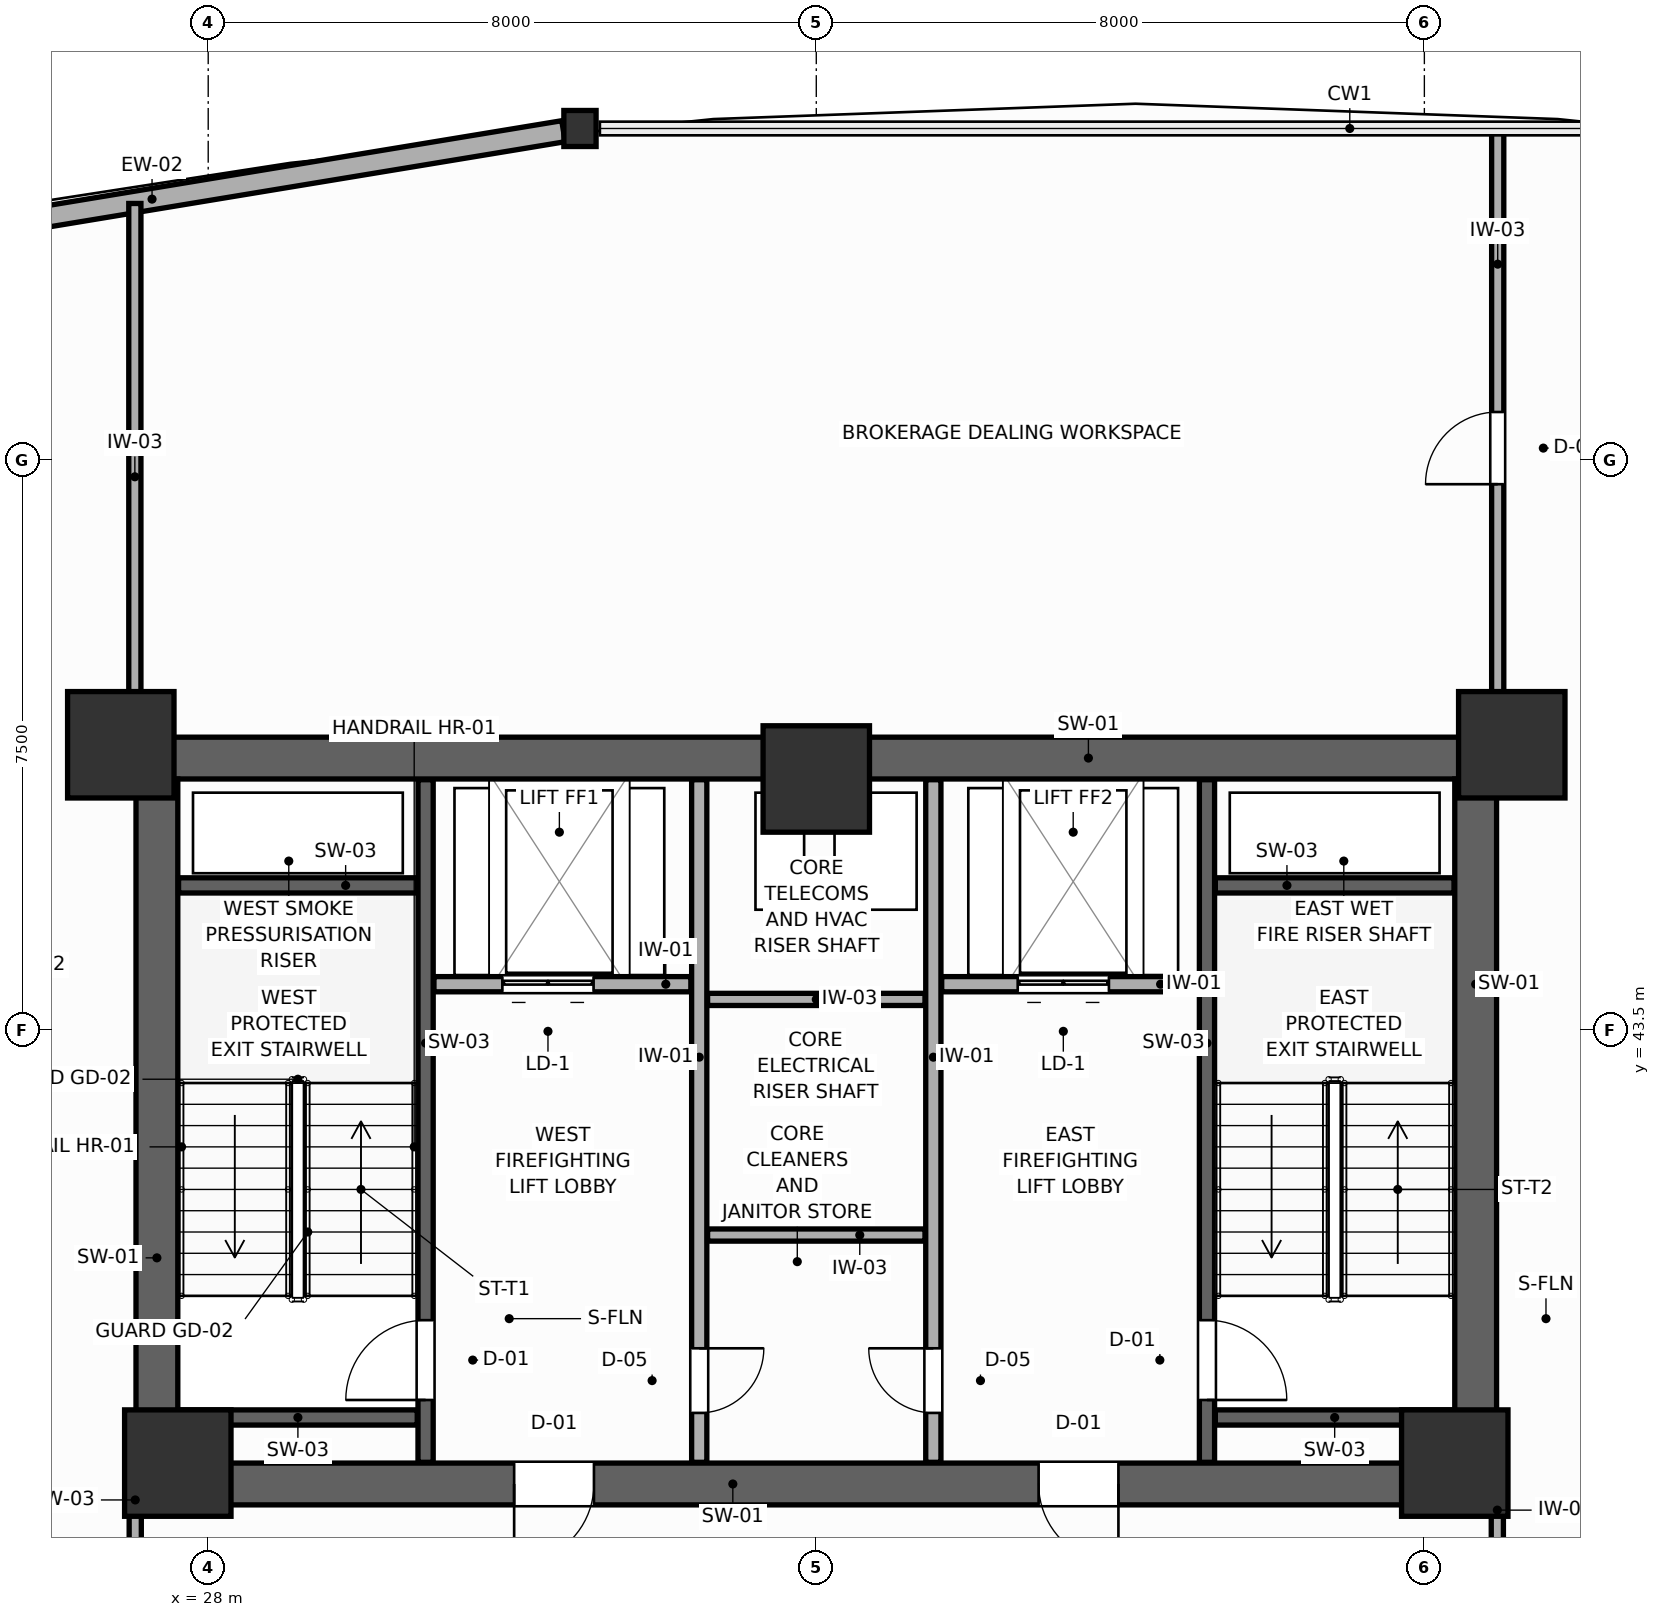
"""IFC4 building model, lengths in metres.
Left out: names, types, materials, properties, quantities, classifications, styles, units other than length and angle.
Written with IfcOpenShell. Run it as: python <this file> out.ifc"""

import sys

from ifc_helpers import new_model, si_unit, direction, frame, frame_2d, origin, origin_2d, place, context, subcontext, project, spatial, rectangle, i_section, extrude, source, transform, mapped, element, fill, save


model = new_model("IFC4")
c1 = context("Model", 3, precision=1e-05, world=origin(), true_north=direction((0.0, 1.0)))
c2 = subcontext(c1, "Body", "Model", "MODEL_VIEW")
j1 = project(units=[si_unit("LENGTHUNIT", "METRE"), si_unit("PLANEANGLEUNIT", "RADIAN")], contexts=[c1])
p1 = place(None, origin())
s1 = spatial("IfcSite", under=j1, at=p1, CompositionType="ELEMENT")
p2 = place(p1, origin())
s2 = spatial("IfcBuilding", under=s1, at=p2, CompositionType="ELEMENT")
p3 = place(p2, frame((0.0, 0.0, 95.1)))
s3 = spatial("IfcBuildingStorey", under=s2, at=p3, CompositionType="ELEMENT", Elevation=95.1)
p4 = place(p3, frame((27.05, 47.075, 0.0), z_axis=(0.0, 0.0, 1.0), x_axis=(1.0, 0.0, 0.0)))
e1 = element("IfcWall", 1, at=p4, inside=s3, PredefinedType="SHEAR", context=c2, shape_type="SweptSolid", body=[
    extrude(rectangle(XDim=17.9, YDim=0.55, at=frame_2d((8.95, 0.0))), origin(), (0.0, 0.0, 1.0), 3.9),
])
p5 = place(p3, frame((27.05, 37.525, 0.0), z_axis=(0.0, 0.0, 1.0), x_axis=(1.0, 0.0, 0.0)))
e2 = element("IfcWall", 2, at=p5, inside=s3, PredefinedType="SHEAR", context=c2, shape_type="SweptSolid", body=[
    extrude(rectangle(XDim=17.9, YDim=0.55, at=frame_2d((8.95, 0.0))), origin(), (0.0, 0.0, 1.0), 3.9),
])
p6 = place(p5, frame((4.975, 0.0, 0.0)))
e3 = element("IfcOpeningElement", 3, at=p6, cuts=e2, PredefinedType="OPENING", context=c2, shape_type="SweptSolid", body=[
    extrude(rectangle(XDim=1.05, YDim=2.1, at=frame_2d((0.525, 1.05))), frame((0.0, 0.285, 0.0), z_axis=(0.0, -1.0, 0.0), x_axis=(1.0, 0.0, 0.0)), (0.0, 0.0, 1.0), 0.57),
])
p7 = place(p5, frame((11.875, 0.0, 0.0)))
e4 = element("IfcOpeningElement", 4, at=p7, cuts=e2, PredefinedType="OPENING", context=c2, shape_type="SweptSolid", body=[
    extrude(rectangle(XDim=1.05, YDim=2.1, at=frame_2d((0.525, 1.05))), frame((0.0, 0.285, 0.0), z_axis=(0.0, -1.0, 0.0), x_axis=(1.0, 0.0, 0.0)), (0.0, 0.0, 1.0), 0.57),
])
for number, where, z_axis, x_axis in (
    (5, (27.325, 37.8, 0.0), (0.0, 0.0, 1.0), (0.0, 1.0, 0.0)),
    (6, (44.675, 37.8, 0.0), (0.0, 0.0, 1.0), (0.0, 1.0, 0.0)),
):
    element("IfcWall", number, at=place(p3, frame(where, z_axis=z_axis, x_axis=x_axis)), inside=s3, PredefinedType="SHEAR", context=c2, shape_type="SweptSolid", body=[
        extrude(rectangle(XDim=9.0, YDim=0.55, at=frame_2d((4.5, 0.0))), origin(), (0.0, 0.0, 1.0), 3.9),
    ])
m1 = source(origin(), c2, "Body", "SweptSolid", [
    extrude(rectangle(XDim=1.4, YDim=1.4, at=origin_2d()), origin(), (0.0, 0.0, 1.0), 3.9),
])
for number, where, z_axis, x_axis in (
    (7, (26.85, 47.25, 0.0), (0.0, 0.0, 1.0), (1.0, 0.0, 0.0)),
    (8, (45.15, 47.25, 0.0), (0.0, 0.0, 1.0), (1.0, 0.0, 0.0)),
    (9, (27.6, 37.8, 0.0), (0.0, 0.0, 1.0), (1.0, 0.0, 0.0)),
    (10, (44.4, 37.8, 0.0), (0.0, 0.0, 1.0), (1.0, 0.0, 0.0)),
    (11, (36.0, 46.8, 0.0), (0.0, 0.0, 1.0), (1.0, 0.0, 0.0)),
):
    element("IfcColumn", number, at=place(p3, frame(where, z_axis=z_axis, x_axis=x_axis)), inside=s3, PredefinedType="COLUMN", context=c2, shape_type="MappedRepresentation", body=[
        mapped(m1, transform((0.0, 0.0, 0.0), scale=1.0)),
    ])
m2 = source(origin(), c2, "Body", "SweptSolid", [
    extrude(i_section(OverallWidth=0.424, OverallDepth=0.474, WebThickness=0.045, FlangeThickness=0.072, FilletRadius=0.015, at=origin_2d()), origin(), (0.0, 0.0, 1.0), 3.9),
])
p8 = place(p3, frame((32.891, 55.358, 0.0), z_axis=(0.0, 0.0, 1.0), x_axis=(1.0, 0.0, 0.0)))
e12 = element("IfcColumn", 12, at=p8, inside=s3, PredefinedType="COLUMN", context=c2, shape_type="MappedRepresentation", body=[
    mapped(m2, transform((0.0, 0.0, 0.0), scale=1.0)),
])
p9 = place(p3, frame((32.674, 55.322, 0.0), z_axis=(0.0, 0.0, 1.0), x_axis=(-0.986649424809, -0.162858566012, 0.0)))
e13 = element("IfcWall", 13, at=p9, inside=s3, PredefinedType="SOLIDWALL", context=c2, shape_type="SweptSolid", body=[
    extrude(rectangle(XDim=16.836, YDim=0.28, at=frame_2d((8.418, 0.0))), origin(), (0.0, 0.0, 1.0), 2.07),
])
p10 = place(p9, frame((11.152, 0.0, 0.75)))
e14 = element("IfcOpeningElement", 14, at=p10, cuts=e13, PredefinedType="OPENING", context=c2, shape_type="SweptSolid", body=[
    extrude(rectangle(XDim=1.7, YDim=1.1, at=frame_2d((0.85, 0.55))), frame((0.0, 0.15, 0.0), z_axis=(0.0, -1.0, 0.0), x_axis=(1.0, 0.0, 0.0)), (0.0, 0.0, 1.0), 0.3),
])
p11 = place(p3, frame((30.86, 37.81, 0.0), z_axis=(0.0, 0.0, 1.0), x_axis=(0.0, 1.0, 0.0)))
e15 = element("IfcWall", 15, at=p11, inside=s3, PredefinedType="SHEAR", context=c2, shape_type="SweptSolid", body=[
    extrude(rectangle(XDim=8.98, YDim=0.2, at=frame_2d((4.49, 0.0))), origin(), (0.0, 0.0, 1.0), 3.9),
])
p12 = place(p11, frame((0.82, 0.0, 0.0)))
e16 = element("IfcOpeningElement", 16, at=p12, cuts=e15, PredefinedType="OPENING", context=c2, shape_type="SweptSolid", body=[
    extrude(rectangle(XDim=1.05, YDim=2.1, at=frame_2d((0.525, 1.05))), frame((0.0, 0.11, 0.0), z_axis=(0.0, -1.0, 0.0), x_axis=(1.0, 0.0, 0.0)), (0.0, 0.0, 1.0), 0.22),
])
for number, where, z_axis, x_axis in (
    (17, (27.61, 45.4, 0.0), (0.0, 0.0, 1.0), (1.0, 0.0, 0.0)),
    (18, (27.61, 38.4, 0.0), (0.0, 0.0, 1.0), (1.0, 0.0, 0.0)),
):
    element("IfcWall", number, at=place(p3, frame(where, z_axis=z_axis, x_axis=x_axis)), inside=s3, PredefinedType="SHEAR", context=c2, shape_type="SweptSolid", body=[
        extrude(rectangle(XDim=3.14, YDim=0.2, at=frame_2d((1.57, 0.0))), origin(), (0.0, 0.0, 1.0), 3.9),
    ])
p13 = place(p3, frame((41.14, 37.81, 0.0), z_axis=(0.0, 0.0, 1.0), x_axis=(0.0, 1.0, 0.0)))
e19 = element("IfcWall", 19, at=p13, inside=s3, PredefinedType="SHEAR", context=c2, shape_type="SweptSolid", body=[
    extrude(rectangle(XDim=8.98, YDim=0.2, at=frame_2d((4.49, 0.0))), origin(), (0.0, 0.0, 1.0), 3.9),
])
p14 = place(p13, frame((0.82, 0.0, 0.0)))
e20 = element("IfcOpeningElement", 20, at=p14, cuts=e19, PredefinedType="OPENING", context=c2, shape_type="SweptSolid", body=[
    extrude(rectangle(XDim=1.05, YDim=2.1, at=frame_2d((0.525, 1.05))), frame((0.0, 0.11, 0.0), z_axis=(0.0, -1.0, 0.0), x_axis=(1.0, 0.0, 0.0)), (0.0, 0.0, 1.0), 0.22),
])
for number, where, z_axis, x_axis in (
    (21, (41.25, 45.4, 0.0), (0.0, 0.0, 1.0), (1.0, 0.0, 0.0)),
    (22, (41.25, 38.4, 0.0), (0.0, 0.0, 1.0), (1.0, 0.0, 0.0)),
):
    element("IfcWall", number, at=place(p3, frame(where, z_axis=z_axis, x_axis=x_axis)), inside=s3, PredefinedType="SHEAR", context=c2, shape_type="SweptSolid", body=[
        extrude(rectangle(XDim=3.14, YDim=0.2, at=frame_2d((1.57, 0.0))), origin(), (0.0, 0.0, 1.0), 3.9),
    ])
p15 = place(p3, frame((30.97, 44.1, 0.0), z_axis=(0.0, 0.0, 1.0), x_axis=(1.0, 0.0, 0.0)))
e23 = element("IfcWall", 23, at=p15, inside=s3, PredefinedType="PARTITIONING", context=c2, shape_type="SweptSolid", body=[
    extrude(rectangle(XDim=3.38, YDim=0.2, at=frame_2d((1.69, 0.0))), origin(), (0.0, 0.0, 1.0), 3.7),
])
p16 = place(p15, frame((0.9, 0.0, 0.0)))
e24 = element("IfcOpeningElement", 24, at=p16, cuts=e23, PredefinedType="OPENING", context=c2, shape_type="SweptSolid", body=[
    extrude(rectangle(XDim=1.2, YDim=2.1, at=frame_2d((0.6, 1.05))), frame((0.0, 0.11, 0.0), z_axis=(0.0, -1.0, 0.0), x_axis=(1.0, 0.0, 0.0)), (0.0, 0.0, 1.0), 0.22),
])
p17 = place(p3, frame((37.65, 44.1, 0.0), z_axis=(0.0, 0.0, 1.0), x_axis=(1.0, 0.0, 0.0)))
e25 = element("IfcWall", 25, at=p17, inside=s3, PredefinedType="PARTITIONING", context=c2, shape_type="SweptSolid", body=[
    extrude(rectangle(XDim=3.38, YDim=0.2, at=frame_2d((1.69, 0.0))), origin(), (0.0, 0.0, 1.0), 3.7),
])
p18 = place(p17, frame((1.0, 0.0, 0.0)))
e26 = element("IfcOpeningElement", 26, at=p18, cuts=e25, PredefinedType="OPENING", context=c2, shape_type="SweptSolid", body=[
    extrude(rectangle(XDim=1.2, YDim=2.1, at=frame_2d((0.6, 1.05))), frame((0.0, 0.11, 0.0), z_axis=(0.0, -1.0, 0.0), x_axis=(1.0, 0.0, 0.0)), (0.0, 0.0, 1.0), 0.22),
])
p19 = place(p3, frame((34.46, 37.81, 0.0), z_axis=(0.0, 0.0, 1.0), x_axis=(0.0, 1.0, 0.0)))
e27 = element("IfcWall", 27, at=p19, inside=s3, PredefinedType="PARTITIONING", context=c2, shape_type="SweptSolid", body=[
    extrude(rectangle(XDim=8.98, YDim=0.2, at=frame_2d((4.49, 0.0))), origin(), (0.0, 0.0, 1.0), 3.7),
])
p20 = place(p19, frame((0.65, 0.0, 0.0)))
e28 = element("IfcOpeningElement", 28, at=p20, cuts=e27, PredefinedType="OPENING", context=c2, shape_type="SweptSolid", body=[
    extrude(rectangle(XDim=0.85, YDim=2.05, at=frame_2d((0.425, 1.025))), frame((0.0, 0.11, 0.0), z_axis=(0.0, -1.0, 0.0), x_axis=(1.0, 0.0, 0.0)), (0.0, 0.0, 1.0), 0.22),
])
p21 = place(p3, frame((37.54, 37.81, 0.0), z_axis=(0.0, 0.0, 1.0), x_axis=(0.0, 1.0, 0.0)))
e29 = element("IfcWall", 29, at=p21, inside=s3, PredefinedType="PARTITIONING", context=c2, shape_type="SweptSolid", body=[
    extrude(rectangle(XDim=8.98, YDim=0.2, at=frame_2d((4.49, 0.0))), origin(), (0.0, 0.0, 1.0), 3.7),
])
p22 = place(p21, frame((0.65, 0.0, 0.0)))
e30 = element("IfcOpeningElement", 30, at=p22, cuts=e29, PredefinedType="OPENING", context=c2, shape_type="SweptSolid", body=[
    extrude(rectangle(XDim=0.85, YDim=2.05, at=frame_2d((0.425, 1.025))), frame((0.0, 0.11, 0.0), z_axis=(0.0, -1.0, 0.0), x_axis=(1.0, 0.0, 0.0)), (0.0, 0.0, 1.0), 0.22),
])
for number, where, z_axis, x_axis in (
    (31, (34.57, 40.8, 0.0), (0.0, 0.0, 1.0), (1.0, 0.0, 0.0)),
    (32, (34.57, 43.9, 0.0), (0.0, 0.0, 1.0), (1.0, 0.0, 0.0)),
):
    element("IfcWall", number, at=place(p3, frame(where, z_axis=z_axis, x_axis=x_axis)), inside=s3, PredefinedType="PARTITIONING", context=c2, shape_type="SweptSolid", body=[
        extrude(rectangle(XDim=2.86, YDim=0.16, at=frame_2d((1.43, 0.0))), origin(), (0.0, 0.0, 1.0), 3.7),
    ])
p23 = place(p3, frame((27.04, 35.0, 0.0), z_axis=(0.0, 0.0, 1.0), x_axis=(0.0, 1.0, 0.0)))
e33 = element("IfcWall", 33, at=p23, inside=s3, PredefinedType="PARTITIONING", context=c2, shape_type="SweptSolid", body=[
    extrude(rectangle(XDim=2.65, YDim=0.16, at=frame_2d((1.325, 0.0))), origin(), (0.0, 0.0, 1.0), 3.7),
])
p24 = place(p23, frame((0.75, 0.0, 0.0)))
e34 = element("IfcOpeningElement", 34, at=p24, cuts=e33, PredefinedType="OPENING", context=c2, shape_type="SweptSolid", body=[
    extrude(rectangle(XDim=1.05, YDim=2.1, at=frame_2d((0.525, 1.05))), frame((0.0, 0.09, 0.0), z_axis=(0.0, -1.0, 0.0), x_axis=(1.0, 0.0, 0.0)), (0.0, 0.0, 1.0), 0.18),
])
p25 = place(p3, frame((44.96, 35.0, 0.0), z_axis=(0.0, 0.0, 1.0), x_axis=(0.0, 1.0, 0.0)))
e35 = element("IfcWall", 35, at=p25, inside=s3, PredefinedType="PARTITIONING", context=c2, shape_type="SweptSolid", body=[
    extrude(rectangle(XDim=2.65, YDim=0.16, at=frame_2d((1.325, 0.0))), origin(), (0.0, 0.0, 1.0), 3.7),
])
p26 = place(p25, frame((0.75, 0.0, 0.0)))
e36 = element("IfcOpeningElement", 36, at=p26, cuts=e35, PredefinedType="OPENING", context=c2, shape_type="SweptSolid", body=[
    extrude(rectangle(XDim=1.05, YDim=2.1, at=frame_2d((0.525, 1.05))), frame((0.0, 0.09, 0.0), z_axis=(0.0, -1.0, 0.0), x_axis=(1.0, 0.0, 0.0)), (0.0, 0.0, 1.0), 0.18),
])
p27 = place(p3, frame((44.965, 47.18, 0.0), z_axis=(0.0, 0.0, 1.0), x_axis=(0.0, 1.0, 0.0)))
e37 = element("IfcWall", 37, at=p27, inside=s3, PredefinedType="PARTITIONING", context=c2, shape_type="SweptSolid", body=[
    extrude(rectangle(XDim=8.158, YDim=0.16, at=frame_2d((4.079, 0.0))), origin(), (0.0, 0.0, 1.0), 2.23),
])
p28 = place(p27, frame((3.498, 0.0, 0.0)))
e38 = element("IfcOpeningElement", 38, at=p28, cuts=e37, PredefinedType="OPENING", context=c2, shape_type="SweptSolid", body=[
    extrude(rectangle(XDim=0.95, YDim=2.05, at=frame_2d((0.475, 1.025))), frame((0.0, 0.09, 0.0), z_axis=(0.0, -1.0, 0.0), x_axis=(1.0, 0.0, 0.0)), (0.0, 0.0, 1.0), 0.18),
])
p29 = place(p3, frame((27.035, 47.18, 0.0), z_axis=(0.0, 0.0, 1.0), x_axis=(0.0, 1.0, 0.0)))
e39 = element("IfcWall", 39, at=p29, inside=s3, PredefinedType="PARTITIONING", context=c2, shape_type="SweptSolid", body=[
    extrude(rectangle(XDim=7.191, YDim=0.16, at=frame_2d((3.596, 0.0))), origin(), (0.0, 0.0, 1.0), 3.7),
])
p30 = place(p12, origin())
e40 = element("IfcDoor", 40, at=p30, inside=s3, OperationType="SINGLE_SWING_LEFT", PredefinedType="DOOR", context=c2, shape_type="SweptSolid", body=[
    extrude(rectangle(XDim=1.05, YDim=2.1, at=frame_2d((0.525, 1.05))), frame((0.0, 0.025, 0.0), z_axis=(0.0, -1.0, 0.0), x_axis=(1.0, 0.0, 0.0)), (0.0, 0.0, 1.0), 0.05),
])
fill(e16, e40)
p31 = place(p14, frame((1.05, 0.0, 0.0), z_axis=(0.0, 0.0, 1.0), x_axis=(-1.0, 0.0, 0.0)))
e41 = element("IfcDoor", 41, at=p31, inside=s3, OperationType="SINGLE_SWING_RIGHT", PredefinedType="DOOR", context=c2, shape_type="SweptSolid", body=[
    extrude(rectangle(XDim=1.05, YDim=2.1, at=frame_2d((0.525, 1.05))), frame((0.0, 0.025, 0.0), z_axis=(0.0, -1.0, 0.0), x_axis=(1.0, 0.0, 0.0)), (0.0, 0.0, 1.0), 0.05),
])
fill(e20, e41)
p32 = place(p16, origin())
e42 = element("IfcDoor", 42, at=p32, inside=s3, OperationType="DOUBLE_DOOR_SLIDING", PredefinedType="DOOR", context=c2, shape_type="SweptSolid", body=[
    extrude(rectangle(XDim=1.2, YDim=2.1, at=frame_2d((0.6, 1.05))), frame((0.0, 0.025, 0.0), z_axis=(0.0, -1.0, 0.0), x_axis=(1.0, 0.0, 0.0)), (0.0, 0.0, 1.0), 0.05),
])
fill(e24, e42)
p33 = place(p18, origin())
e43 = element("IfcDoor", 43, at=p33, inside=s3, OperationType="DOUBLE_DOOR_SLIDING", PredefinedType="DOOR", context=c2, shape_type="SweptSolid", body=[
    extrude(rectangle(XDim=1.2, YDim=2.1, at=frame_2d((0.6, 1.05))), frame((0.0, 0.025, 0.0), z_axis=(0.0, -1.0, 0.0), x_axis=(1.0, 0.0, 0.0)), (0.0, 0.0, 1.0), 0.05),
])
fill(e26, e43)
p34 = place(p20, frame((0.85, 0.0, 0.0), z_axis=(0.0, 0.0, 1.0), x_axis=(-1.0, 0.0, 0.0)))
e44 = element("IfcDoor", 44, at=p34, inside=s3, OperationType="SINGLE_SWING_LEFT", PredefinedType="DOOR", context=c2, shape_type="SweptSolid", body=[
    extrude(rectangle(XDim=0.85, YDim=2.05, at=frame_2d((0.425, 1.025))), frame((0.0, 0.025, 0.0), z_axis=(0.0, -1.0, 0.0), x_axis=(1.0, 0.0, 0.0)), (0.0, 0.0, 1.0), 0.05),
])
fill(e28, e44)
p35 = place(p22, origin())
e45 = element("IfcDoor", 45, at=p35, inside=s3, OperationType="SINGLE_SWING_RIGHT", PredefinedType="DOOR", context=c2, shape_type="SweptSolid", body=[
    extrude(rectangle(XDim=0.85, YDim=2.05, at=frame_2d((0.425, 1.025))), frame((0.0, 0.025, 0.0), z_axis=(0.0, -1.0, 0.0), x_axis=(1.0, 0.0, 0.0)), (0.0, 0.0, 1.0), 0.05),
])
fill(e30, e45)
p36 = place(p28, origin())
e46 = element("IfcDoor", 46, at=p36, inside=s3, OperationType="SINGLE_SWING_LEFT", PredefinedType="DOOR", context=c2, shape_type="SweptSolid", body=[
    extrude(rectangle(XDim=0.95, YDim=2.05, at=frame_2d((0.475, 1.025))), frame((0.0, 0.025, 0.0), z_axis=(0.0, -1.0, 0.0), x_axis=(1.0, 0.0, 0.0)), (0.0, 0.0, 1.0), 0.05),
])
fill(e38, e46)
p37 = place(p6, frame((1.05, 0.0, 0.0), z_axis=(0.0, 0.0, 1.0), x_axis=(-1.0, 0.0, 0.0)))
e47 = element("IfcDoor", 47, at=p37, inside=s3, OperationType="SINGLE_SWING_RIGHT", PredefinedType="DOOR", context=c2, shape_type="SweptSolid", body=[
    extrude(rectangle(XDim=1.05, YDim=2.1, at=frame_2d((0.525, 1.05))), frame((0.0, 0.025, 0.0), z_axis=(0.0, -1.0, 0.0), x_axis=(1.0, 0.0, 0.0)), (0.0, 0.0, 1.0), 0.05),
])
fill(e3, e47)
p38 = place(p7, frame((1.05, 0.0, 0.0), z_axis=(0.0, 0.0, 1.0), x_axis=(-1.0, 0.0, 0.0)))
e48 = element("IfcDoor", 48, at=p38, inside=s3, OperationType="SINGLE_SWING_LEFT", PredefinedType="DOOR", context=c2, shape_type="SweptSolid", body=[
    extrude(rectangle(XDim=1.05, YDim=2.1, at=frame_2d((0.525, 1.05))), frame((0.0, 0.025, 0.0), z_axis=(0.0, -1.0, 0.0), x_axis=(1.0, 0.0, 0.0)), (0.0, 0.0, 1.0), 0.05),
])
fill(e4, e48)
save(model, sys.argv[1])
